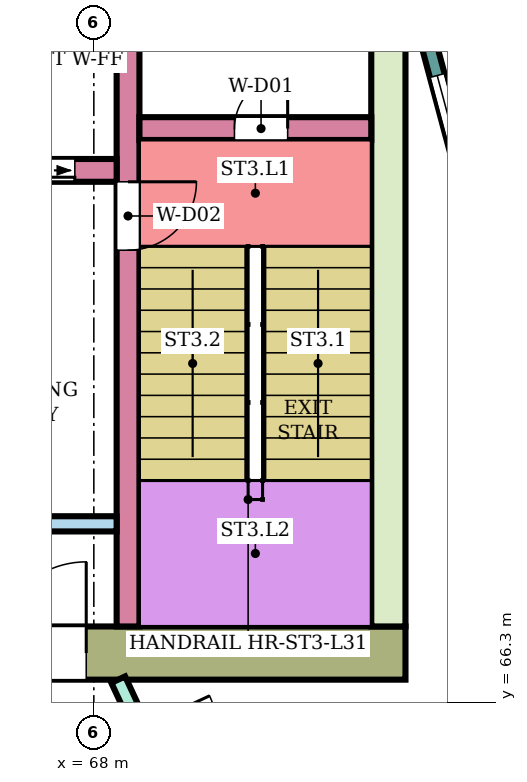
"""IFC4 building model, lengths in metres.
Left out: names, types, materials, properties, quantities, classifications, styles, units other than length and angle.
Written with IfcOpenShell. Run it as: python <this file> out.ifc"""

import sys

from ifc_helpers import new_model, si_unit, direction, frame, frame_2d, origin, place, context, subcontext, project, spatial, rectangle, extrude, element, fill, save


model = new_model("IFC4")
c1 = context("Model", 3, precision=1e-05, world=origin(), true_north=direction((0.0, 1.0)))
c2 = subcontext(c1, "Body", "Model", "MODEL_VIEW")
j1 = project(units=[si_unit("LENGTHUNIT", "METRE"), si_unit("PLANEANGLEUNIT", "RADIAN")], contexts=[c1])
p1 = place(None, origin())
s1 = spatial("IfcSite", under=j1, at=p1, CompositionType="ELEMENT")
p2 = place(p1, origin())
s2 = spatial("IfcBuilding", under=s1, at=p2, CompositionType="ELEMENT")
p3 = place(p2, frame((0.0, 0.0, 134.1)))
s3 = spatial("IfcBuildingStorey", under=s2, at=p3, CompositionType="ELEMENT", Elevation=134.1)
p4 = place(p3, frame((72.1, 66.95, 0.0), z_axis=(0.0, 0.0, 1.0), x_axis=(-1.0, 0.0, 0.0)))
e1 = element("IfcWall", 1, at=p4, inside=s3, PredefinedType="SHEAR", context=c2, shape_type="SweptSolid", body=[
    extrude(rectangle(XDim=14.8, YDim=0.7, at=frame_2d((7.4, 0.0))), origin(), (0.0, 0.0, 1.0), 3.58),
])
p5 = place(p4, frame((4.2, 0.0, 0.0)))
e2 = element("IfcOpeningElement", 2, at=p5, cuts=e1, PredefinedType="OPENING", context=c2, shape_type="SweptSolid", body=[
    extrude(rectangle(XDim=2.4, YDim=2.4, at=frame_2d((1.2, 1.2))), frame((0.0, 0.36, 0.0), z_axis=(0.0, -1.0, 0.0), x_axis=(1.0, 0.0, 0.0)), (0.0, 0.0, 1.0), 0.72),
])
p6 = place(p3, frame((71.875, 75.0, 0.0), z_axis=(0.0, 0.0, 1.0), x_axis=(0.0, -1.0, 0.0)))
e3 = element("IfcWall", 3, at=p6, inside=s3, PredefinedType="SHEAR", context=c2, shape_type="SweptSolid", body=[
    extrude(rectangle(XDim=7.7, YDim=0.45, at=frame_2d((3.85, 0.0))), origin(), (0.0, 0.0, 1.0), 3.58),
])
p7 = place(p3, frame((68.45, 75.0, 0.0), z_axis=(0.0, 0.0, 1.0), x_axis=(0.0, -1.0, 0.0)))
e4 = element("IfcWall", 4, at=p7, inside=s3, PredefinedType="SHEAR", context=c2, shape_type="SweptSolid", body=[
    extrude(rectangle(XDim=7.7, YDim=0.3, at=frame_2d((3.85, 0.0))), origin(), (0.0, 0.0, 1.0), 3.58),
])
p8 = place(p7, frame((1.85, 0.0, 0.0)))
e5 = element("IfcOpeningElement", 5, at=p8, cuts=e4, PredefinedType="OPENING", context=c2, shape_type="SweptSolid", body=[
    extrude(rectangle(XDim=0.9, YDim=2.1, at=frame_2d((0.45, 1.05))), frame((0.0, 0.16, 0.0), z_axis=(0.0, -1.0, 0.0), x_axis=(1.0, 0.0, 0.0)), (0.0, 0.0, 1.0), 0.32),
])
p9 = place(p3, frame((71.65, 73.85, 0.0), z_axis=(0.0, 0.0, 1.0), x_axis=(-1.0, 0.0, 0.0)))
e6 = element("IfcWall", 6, at=p9, inside=s3, PredefinedType="SHEAR", context=c2, shape_type="SweptSolid", body=[
    extrude(rectangle(XDim=3.05, YDim=0.3, at=frame_2d((1.525, 0.0))), origin(), (0.0, 0.0, 1.0), 3.58),
])
p10 = place(p9, frame((1.1, 0.0, 0.0)))
e7 = element("IfcOpeningElement", 7, at=p10, cuts=e6, PredefinedType="OPENING", context=c2, shape_type="SweptSolid", body=[
    extrude(rectangle(XDim=0.7, YDim=2.0, at=frame_2d((0.35, 1.0))), frame((0.0, 0.16, 0.0), z_axis=(0.0, -1.0, 0.0), x_axis=(1.0, 0.0, 0.0)), (0.0, 0.0, 1.0), 0.32),
])
p11 = place(p3, frame((68.3, 73.3, 0.0), z_axis=(0.0, 0.0, 1.0), x_axis=(-1.0, 0.0, 0.0)))
e8 = element("IfcWall", 8, at=p11, inside=s3, PredefinedType="SHEAR", context=c2, shape_type="SweptSolid", body=[
    extrude(rectangle(XDim=11.0, YDim=0.3, at=frame_2d((5.5, 0.0))), origin(), (0.0, 0.0, 1.0), 3.58),
])
p12 = place(p11, frame((0.55, 0.0, 0.0)))
e9 = element("IfcOpeningElement", 9, at=p12, cuts=e8, PredefinedType="OPENING", context=c2, shape_type="SweptSolid", body=[
    extrude(rectangle(XDim=1.1, YDim=2.1, at=frame_2d((0.55, 1.05))), frame((0.0, 0.16, 0.0), z_axis=(0.0, -1.0, 0.0), x_axis=(1.0, 0.0, 0.0)), (0.0, 0.0, 1.0), 0.32),
])
p13 = place(p11, frame((8.1, 0.0, 0.0)))
e10 = element("IfcOpeningElement", 10, at=p13, cuts=e8, PredefinedType="OPENING", context=c2, shape_type="SweptSolid", body=[
    extrude(rectangle(XDim=1.0, YDim=2.1, at=frame_2d((0.5, 1.05))), frame((0.0, 0.16, 0.0), z_axis=(0.0, -1.0, 0.0), x_axis=(1.0, 0.0, 0.0)), (0.0, 0.0, 1.0), 0.32),
])
p14 = place(p3, frame((68.3, 68.65, 0.0), z_axis=(0.0, 0.0, 1.0), x_axis=(-1.0, 0.0, 0.0)))
e11 = element("IfcWall", 11, at=p14, inside=s3, PredefinedType="SHEAR", context=c2, shape_type="SweptSolid", body=[
    extrude(rectangle(XDim=4.5, YDim=0.2, at=frame_2d((2.25, 0.0))), origin(), (0.0, 0.0, 1.0), 3.58),
])
p15 = place(p3, frame((72.396, 75.0, 0.0), z_axis=(0.0, 0.0, 1.0), x_axis=(0.258789828301, -0.965933654434, 0.0)))
e12 = element("IfcWall", 12, at=p15, inside=s3, PredefinedType="NOTDEFINED", context=c2, shape_type="SweptSolid", body=[
    extrude(rectangle(XDim=3.936, YDim=0.2, at=frame_2d((1.968, 0.0))), origin(), (0.0, 0.0, 1.0), 3.9),
])
p16 = place(p15, frame((0.468, 0.0, 0.9)))
e13 = element("IfcOpeningElement", 13, at=p16, cuts=e12, PredefinedType="OPENING", context=c2, shape_type="SweptSolid", body=[
    extrude(rectangle(XDim=3.0, YDim=2.3, at=frame_2d((1.5, 1.15))), frame((0.0, 0.11, 0.0), z_axis=(0.0, -1.0, 0.0), x_axis=(1.0, 0.0, 0.0)), (0.0, 0.0, 1.0), 0.22),
])
p17 = place(p3, frame((68.321, 66.6, 0.0), z_axis=(0.0, 0.0, 1.0), x_axis=(0.421914092414, -0.906635813666, 0.0)))
e14 = element("IfcWall", 14, at=p17, inside=s3, PredefinedType="PARTITIONING", context=c2, shape_type="SweptSolid", body=[
    extrude(rectangle(XDim=7.459, YDim=0.2, at=frame_2d((3.73, 0.0))), origin(), (0.0, 0.0, 1.0), 3.45),
])
p18 = place(p17, frame((0.7, 0.0, 0.0)))
e15 = element("IfcOpeningElement", 15, at=p18, cuts=e14, PredefinedType="OPENING", context=c2, shape_type="SweptSolid", body=[
    extrude(rectangle(XDim=1.0, YDim=2.1, at=frame_2d((0.5, 1.05))), frame((0.0, 0.11, 0.0), z_axis=(0.0, -1.0, 0.0), x_axis=(1.0, 0.0, 0.0)), (0.0, 0.0, 1.0), 0.22),
])
p19 = place(p3, frame((71.462, 60.217, 0.0), z_axis=(0.0, 0.0, 1.0), x_axis=(0.500094460186, 0.865970860302, 0.0)))
e16 = element("IfcWall", 16, at=p19, inside=s3, PredefinedType="PARTITIONING", context=c2, shape_type="SweptSolid", body=[
    extrude(rectangle(XDim=9.373, YDim=0.2, at=frame_2d((4.687, 0.0))), origin(), (0.0, 0.0, 1.0), 3.45),
])
p20 = place(p16, origin())
e17 = element("IfcWindow", 17, at=p20, inside=s3, PartitioningType="SINGLE_PANEL", PredefinedType="WINDOW", context=c2, shape_type="SweptSolid", body=[
    extrude(rectangle(XDim=3.0, YDim=2.3, at=frame_2d((1.5, 1.15))), frame((0.0, 0.03, 0.0), z_axis=(0.0, -1.0, 0.0), x_axis=(1.0, 0.0, 0.0)), (0.0, 0.0, 1.0), 0.06),
])
fill(e13, e17)
p21 = place(p10, frame((0.7, 0.0, 0.0), z_axis=(0.0, 0.0, 1.0), x_axis=(-1.0, 0.0, 0.0)))
e18 = element("IfcDoor", 18, at=p21, inside=s3, OperationType="SINGLE_SWING_RIGHT", PredefinedType="DOOR", context=c2, shape_type="SweptSolid", body=[
    extrude(rectangle(XDim=0.7, YDim=2.0, at=frame_2d((0.35, 1.0))), frame((0.0, 0.025, 0.0), z_axis=(0.0, -1.0, 0.0), x_axis=(1.0, 0.0, 0.0)), (0.0, 0.0, 1.0), 0.05),
])
fill(e7, e18)
p22 = place(p8, origin())
e19 = element("IfcDoor", 19, at=p22, inside=s3, OperationType="SINGLE_SWING_LEFT", PredefinedType="DOOR", context=c2, shape_type="SweptSolid", body=[
    extrude(rectangle(XDim=0.9, YDim=2.1, at=frame_2d((0.45, 1.05))), frame((0.0, 0.025, 0.0), z_axis=(0.0, -1.0, 0.0), x_axis=(1.0, 0.0, 0.0)), (0.0, 0.0, 1.0), 0.05),
])
fill(e5, e19)
p23 = place(p12, origin())
e20 = element("IfcDoor", 20, at=p23, inside=s3, OperationType="DOUBLE_DOOR_SLIDING", PredefinedType="DOOR", context=c2, shape_type="SweptSolid", body=[
    extrude(rectangle(XDim=1.1, YDim=2.1, at=frame_2d((0.55, 1.05))), frame((0.0, 0.025, 0.0), z_axis=(0.0, -1.0, 0.0), x_axis=(1.0, 0.0, 0.0)), (0.0, 0.0, 1.0), 0.05),
])
fill(e9, e20)
p24 = place(p5, frame((2.4, 0.0, 0.0), z_axis=(0.0, 0.0, 1.0), x_axis=(-1.0, 0.0, 0.0)))
e21 = element("IfcDoor", 21, at=p24, inside=s3, OperationType="DOUBLE_DOOR_SINGLE_SWING", PredefinedType="DOOR", context=c2, shape_type="SweptSolid", body=[
    extrude(rectangle(XDim=2.4, YDim=2.4, at=frame_2d((1.2, 1.2))), frame((0.0, 0.025, 0.0), z_axis=(0.0, -1.0, 0.0), x_axis=(1.0, 0.0, 0.0)), (0.0, 0.0, 1.0), 0.05),
])
fill(e2, e21)
save(model, sys.argv[1])
